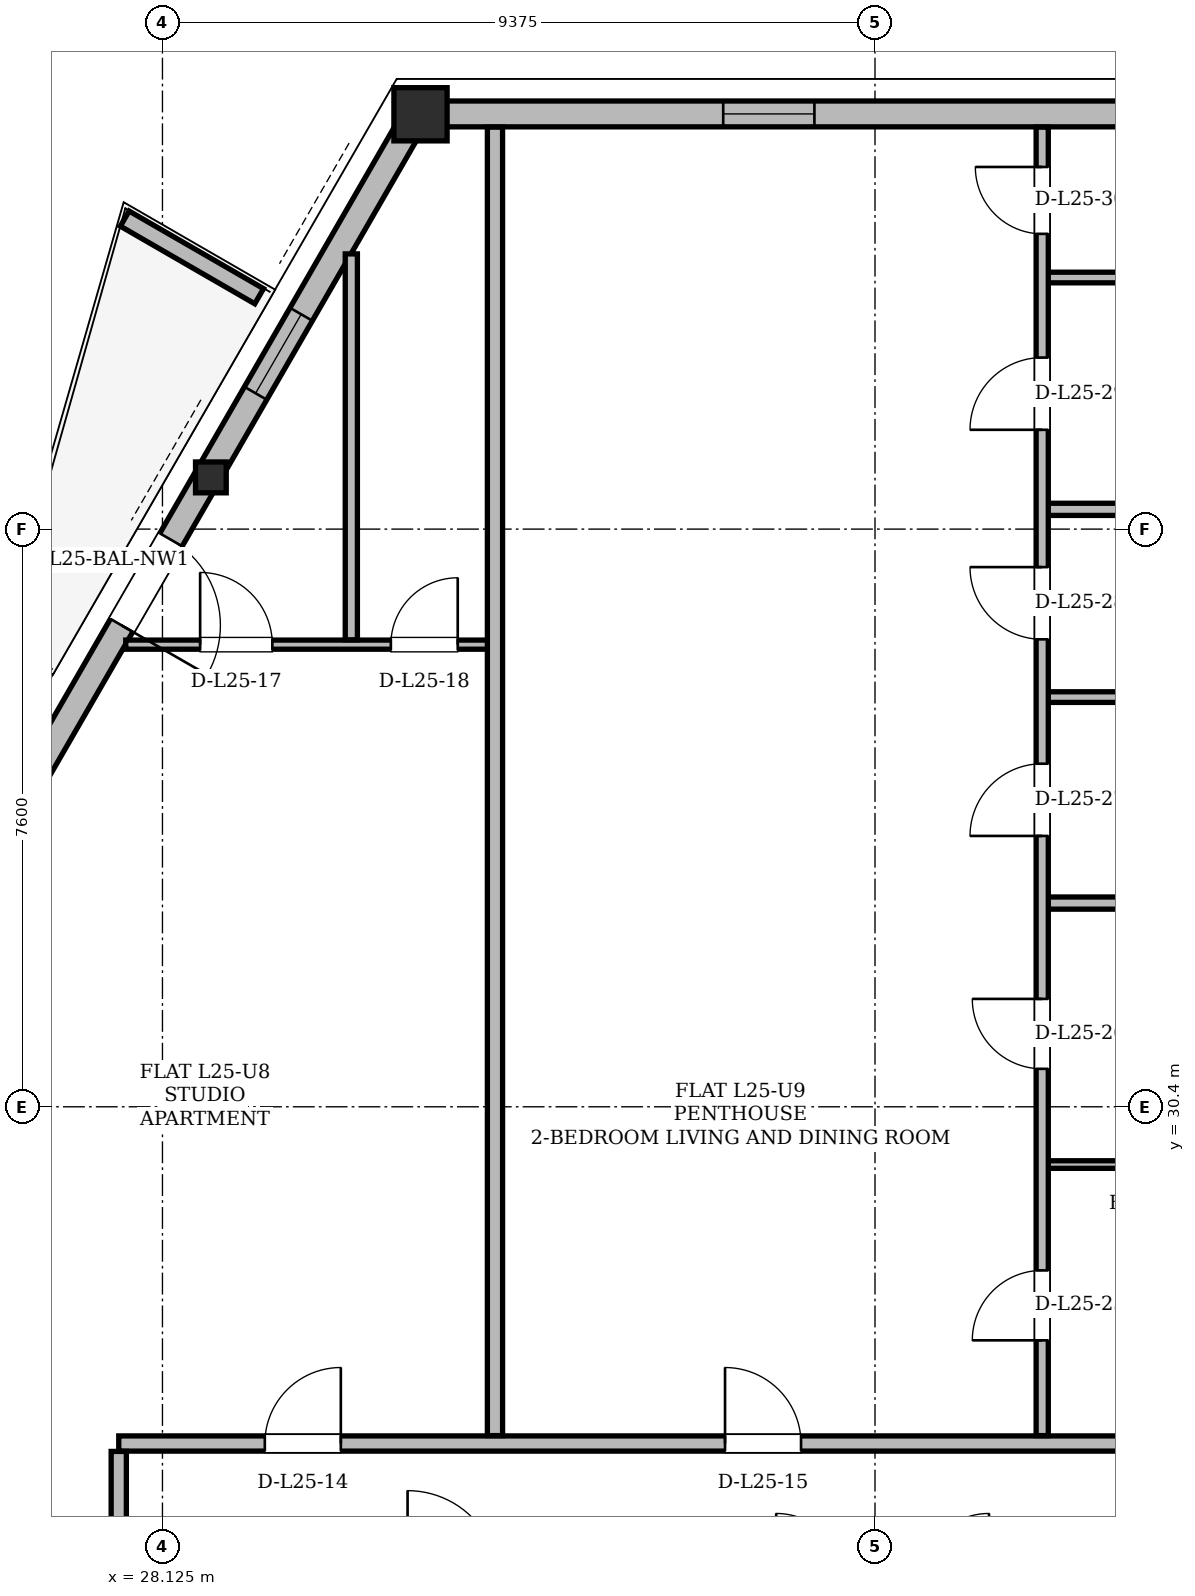
"""IFC4 building model, lengths in metres.
Left out: names, types, materials, properties, quantities, classifications, styles, units other than length and angle.
Written with IfcOpenShell. Run it as: python <this file> out.ifc"""

import sys

from ifc_helpers import new_model, si_unit, direction, frame, frame_2d, origin, origin_2d, place, context, subcontext, project, spatial, polyline, rectangle, hollow_rectangle, i_section, outline, extrude, element, fill, save


model = new_model("IFC4")
c1 = context("Model", 3, precision=1e-05, world=origin(), true_north=direction((0.0, 1.0)))
c2 = subcontext(c1, "Body", "Model", "MODEL_VIEW")
j1 = project(units=[si_unit("LENGTHUNIT", "METRE"), si_unit("PLANEANGLEUNIT", "RADIAN")], contexts=[c1])
p1 = place(None, origin())
s1 = spatial("IfcSite", under=j1, at=p1, CompositionType="ELEMENT")
p2 = place(p1, origin())
s2 = spatial("IfcBuilding", under=s1, at=p2, CompositionType="ELEMENT")
p3 = place(p2, frame((0.0, 0.0, 96.9)))
s3 = spatial("IfcBuildingStorey", under=s2, at=p3, CompositionType="ELEMENT", Elevation=96.9)
p4 = place(p3, frame((31.472, 43.462, 0.005), z_axis=(0.026708710298, -0.002650482701, 0.999639744976), x_axis=(0.098751584092, 0.995112116618, 0.0)))
e1 = element("IfcColumn", 1, at=p4, inside=s3, PredefinedType="COLUMN", context=c2, shape_type="SweptSolid", body=[
    extrude(hollow_rectangle(XDim=0.7, YDim=0.7, WallThickness=0.055, at=origin_2d()), origin(), (0.0, 0.0, 1.0), 3.592),
])
p5 = place(p3, frame((28.717, 38.691, 0.005), z_axis=(0.024942541221, -0.005708919517, 0.999672585338), x_axis=(0.223113275422, 0.974792524761, 0.0)))
e2 = element("IfcColumn", 2, at=p5, inside=s3, PredefinedType="COLUMN", context=c2, shape_type="SweptSolid", body=[
    extrude(i_section(OverallWidth=0.404, OverallDepth=0.406, WebThickness=0.027, FlangeThickness=0.044, at=origin_2d()), origin(), (0.0, 0.0, 1.0), 3.592),
])
p6 = place(p3, frame((43.528, 43.462, 0.0), z_axis=(0.0, 0.0, 1.0), x_axis=(-1.0, 0.0, 0.0)))
e3 = element("IfcWall", 3, at=p6, inside=s3, PredefinedType="SOLIDWALL", context=c2, shape_type="SweptSolid", body=[
    extrude(rectangle(XDim=12.056, YDim=0.34, at=frame_2d((6.028, 0.0))), origin(), (0.0, 0.0, 1.0), 2.578),
])
p7 = place(p6, frame((6.825, 0.0, 0.85)))
e4 = element("IfcOpeningElement", 4, at=p7, cuts=e3, PredefinedType="OPENING", context=c2, shape_type="SweptSolid", body=[
    extrude(rectangle(XDim=1.2, YDim=1.48, at=frame_2d((0.6, 0.74))), frame((0.0, 0.17, 0.0), z_axis=(0.0, -1.0, 0.0), x_axis=(1.0, 0.0, 0.0)), (0.0, 0.0, 1.0), 0.34),
])
p8 = place(p3, frame((31.472, 43.462, 0.0), z_axis=(0.0, 0.0, 1.0), x_axis=(-0.499995749028, -0.86602785807, 0.0)))
e5 = element("IfcWall", 5, at=p8, inside=s3, PredefinedType="SOLIDWALL", context=c2, shape_type="SweptSolid", body=[
    extrude(rectangle(XDim=34.437, YDim=0.34, at=frame_2d((17.218, 0.0))), origin(), (0.0, 0.0, 1.0), 2.578),
])
p9 = place(p8, frame((6.469, 0.0, 0.0)))
e6 = element("IfcOpeningElement", 6, at=p9, cuts=e5, PredefinedType="OPENING", context=c2, shape_type="SweptSolid", body=[
    extrude(rectangle(XDim=1.3, YDim=2.2, at=frame_2d((0.65, 1.1))), frame((0.0, 0.17, 0.0), z_axis=(0.0, -1.0, 0.0), x_axis=(1.0, 0.0, 0.0)), (0.0, 0.0, 1.0), 0.34),
])
p10 = place(p8, frame((24.902, 0.0, 0.0)))
e7 = element("IfcOpeningElement", 7, at=p10, cuts=e5, PredefinedType="OPENING", context=c2, shape_type="SweptSolid", body=[
    extrude(rectangle(XDim=1.5, YDim=2.2, at=frame_2d((0.75, 1.1))), frame((0.0, 0.17, 0.0), z_axis=(0.0, -1.0, 0.0), x_axis=(1.0, 0.0, 0.0)), (0.0, 0.0, 1.0), 0.34),
])
p11 = place(p8, frame((30.75, 0.0, 0.85)))
e8 = element("IfcOpeningElement", 8, at=p11, cuts=e5, PredefinedType="OPENING", context=c2, shape_type="SweptSolid", body=[
    extrude(rectangle(XDim=1.4, YDim=1.6, at=frame_2d((0.7, 0.8))), frame((0.0, 0.17, 0.0), z_axis=(0.0, -1.0, 0.0), x_axis=(1.0, 0.0, 0.0)), (0.0, 0.0, 1.0), 0.34),
])
p12 = place(p8, frame((11.337, 0.0, 0.85)))
e9 = element("IfcOpeningElement", 9, at=p12, cuts=e5, PredefinedType="OPENING", context=c2, shape_type="SweptSolid", body=[
    extrude(rectangle(XDim=2.8, YDim=1.618, at=frame_2d((1.4, 0.809))), frame((0.0, 0.17, 0.0), z_axis=(0.0, -1.0, 0.0), x_axis=(1.0, 0.0, 0.0)), (0.0, 0.0, 1.0), 0.34),
])
p13 = place(p8, frame((18.111, 0.0, 0.85)))
e10 = element("IfcOpeningElement", 10, at=p13, cuts=e5, PredefinedType="OPENING", context=c2, shape_type="SweptSolid", body=[
    extrude(rectangle(XDim=2.2, YDim=1.618, at=frame_2d((1.1, 0.809))), frame((0.0, 0.17, 0.0), z_axis=(0.0, -1.0, 0.0), x_axis=(1.0, 0.0, 0.0)), (0.0, 0.0, 1.0), 0.34),
])
p14 = place(p8, frame((3.044, 0.0, 0.85)))
e11 = element("IfcOpeningElement", 11, at=p14, cuts=e5, PredefinedType="OPENING", context=c2, shape_type="SweptSolid", body=[
    extrude(rectangle(XDim=1.2, YDim=1.48, at=frame_2d((0.6, 0.74))), frame((0.0, 0.17, 0.0), z_axis=(0.0, -1.0, 0.0), x_axis=(1.0, 0.0, 0.0)), (0.0, 0.0, 1.0), 0.34),
])
p15 = place(p3, frame((29.397, 41.064, 0.0), z_axis=(0.0, 0.0, 1.0), x_axis=(-0.866042246008, 0.499970827278, 0.0)))
e12 = element("IfcWall", 12, at=p15, inside=s3, PredefinedType="PARAPET", context=c2, shape_type="SweptSolid", body=[
    extrude(outline(polyline([(0.0, 0.0), (2.042, 0.0), (2.042, 1.1), (0.0, 1.32), (0.0, 0.0)])), frame((0.0, 0.115, 0.0), z_axis=(0.0, -1.0, 0.0), x_axis=(1.0, 0.0, 0.0)), (0.0, 0.0, 1.0), 0.23),
])
p16 = place(p3, frame((27.55, 25.97, 0.0), z_axis=(0.0, 0.0, 1.0), x_axis=(1.0, 0.0, 0.0)))
e13 = element("IfcWall", 13, at=p16, inside=s3, PredefinedType="PARTITIONING", context=c2, shape_type="SweptSolid", body=[
    extrude(rectangle(XDim=19.9, YDim=0.2, at=frame_2d((9.95, 0.0))), origin(), (0.0, 0.0, 1.0), 2.814),
])
p17 = place(p16, frame((1.922, 0.0, 0.0)))
e14 = element("IfcOpeningElement", 14, at=p17, cuts=e13, PredefinedType="OPENING", context=c2, shape_type="SweptSolid", body=[
    extrude(rectangle(XDim=1.0, YDim=2.18, at=frame_2d((0.5, 1.09))), frame((0.0, 0.1, 0.0), z_axis=(0.0, -1.0, 0.0), x_axis=(1.0, 0.0, 0.0)), (0.0, 0.0, 1.0), 0.2),
])
p18 = place(p16, frame((7.977, 0.0, 0.0)))
e15 = element("IfcOpeningElement", 15, at=p18, cuts=e13, PredefinedType="OPENING", context=c2, shape_type="SweptSolid", body=[
    extrude(rectangle(XDim=1.0, YDim=2.18, at=frame_2d((0.5, 1.09))), frame((0.0, 0.1, 0.0), z_axis=(0.0, -1.0, 0.0), x_axis=(1.0, 0.0, 0.0)), (0.0, 0.0, 1.0), 0.2),
])
p19 = place(p16, frame((16.83, 0.0, 0.0)))
e16 = element("IfcOpeningElement", 16, at=p19, cuts=e13, PredefinedType="OPENING", context=c2, shape_type="SweptSolid", body=[
    extrude(rectangle(XDim=1.0, YDim=2.18, at=frame_2d((0.5, 1.09))), frame((0.0, 0.1, 0.0), z_axis=(0.0, -1.0, 0.0), x_axis=(1.0, 0.0, 0.0)), (0.0, 0.0, 1.0), 0.2),
])
p20 = place(p3, frame((39.7, 29.64, 0.0), z_axis=(0.0, 0.0, 1.0), x_axis=(1.0, 0.0, 0.0)))
e17 = element("IfcWall", 17, at=p20, inside=s3, PredefinedType="PARTITIONING", context=c2, shape_type="SweptSolid", body=[
    extrude(rectangle(XDim=2.85, YDim=0.1, at=frame_2d((1.425, 0.0))), origin(), (0.0, 0.0, 1.0), 3.36),
])
p21 = place(p3, frame((39.7, 33.08, 0.0), z_axis=(0.0, 0.0, 1.0), x_axis=(1.0, 0.0, 0.0)))
e18 = element("IfcWall", 18, at=p21, inside=s3, PredefinedType="PARTITIONING", context=c2, shape_type="SweptSolid", body=[
    extrude(rectangle(XDim=2.85, YDim=0.16, at=frame_2d((1.425, 0.0))), origin(), (0.0, 0.0, 1.0), 3.36),
])
p22 = place(p3, frame((39.7, 35.79, 0.0), z_axis=(0.0, 0.0, 1.0), x_axis=(1.0, 0.0, 0.0)))
e19 = element("IfcWall", 19, at=p22, inside=s3, PredefinedType="PARTITIONING", context=c2, shape_type="SweptSolid", body=[
    extrude(rectangle(XDim=2.85, YDim=0.14, at=frame_2d((1.425, 0.0))), origin(), (0.0, 0.0, 1.0), 3.36),
])
p23 = place(p3, frame((27.642, 36.48, 0.0), z_axis=(0.0, 0.0, 1.0), x_axis=(1.0, 0.0, 0.0)))
e20 = element("IfcWall", 20, at=p23, inside=s3, PredefinedType="PARTITIONING", context=c2, shape_type="SweptSolid", body=[
    extrude(rectangle(XDim=4.908, YDim=0.12, at=frame_2d((2.454, 0.0))), origin(), (0.0, 0.0, 1.0), 2.814),
])
p24 = place(p23, frame((0.979, 0.0, 0.0)))
e21 = element("IfcOpeningElement", 21, at=p24, cuts=e20, PredefinedType="OPENING", context=c2, shape_type="SweptSolid", body=[
    extrude(rectangle(XDim=0.95, YDim=2.1, at=frame_2d((0.475, 1.05))), frame((0.0, 0.06, 0.0), z_axis=(0.0, -1.0, 0.0), x_axis=(1.0, 0.0, 0.0)), (0.0, 0.0, 1.0), 0.12),
])
p25 = place(p23, frame((3.488, 0.0, 0.0)))
e22 = element("IfcOpeningElement", 22, at=p25, cuts=e20, PredefinedType="OPENING", context=c2, shape_type="SweptSolid", body=[
    extrude(rectangle(XDim=0.88, YDim=2.08, at=frame_2d((0.44, 1.04))), frame((0.0, 0.06, 0.0), z_axis=(0.0, -1.0, 0.0), x_axis=(1.0, 0.0, 0.0)), (0.0, 0.0, 1.0), 0.12),
])
p26 = place(p3, frame((39.7, 38.26, 0.0), z_axis=(0.0, 0.0, 1.0), x_axis=(1.0, 0.0, 0.0)))
e23 = element("IfcWall", 23, at=p26, inside=s3, PredefinedType="PARTITIONING", context=c2, shape_type="SweptSolid", body=[
    extrude(rectangle(XDim=2.85, YDim=0.16, at=frame_2d((1.425, 0.0))), origin(), (0.0, 0.0, 1.0), 3.36),
])
p27 = place(p3, frame((39.7, 41.31, 0.0), z_axis=(0.0, 0.0, 1.0), x_axis=(1.0, 0.0, 0.0)))
e24 = element("IfcWall", 24, at=p27, inside=s3, PredefinedType="PARTITIONING", context=c2, shape_type="SweptSolid", body=[
    extrude(rectangle(XDim=2.85, YDim=0.14, at=frame_2d((1.425, 0.0))), origin(), (0.0, 0.0, 1.0), 3.36),
])
p28 = place(p3, frame((27.55, 11.054, 0.0), z_axis=(0.0, 0.0, 1.0), x_axis=(0.0, 1.0, 0.0)))
e25 = element("IfcWall", 25, at=p28, inside=s3, PredefinedType="PARTITIONING", context=c2, shape_type="SweptSolid", body=[
    extrude(rectangle(XDim=14.812, YDim=0.2, at=frame_2d((7.406, 0.0))), origin(), (0.0, 0.0, 1.0), 2.814),
])
p29 = place(p28, frame((3.825, 0.0, 0.0)))
e26 = element("IfcOpeningElement", 26, at=p29, cuts=e25, PredefinedType="OPENING", context=c2, shape_type="SweptSolid", body=[
    extrude(rectangle(XDim=1.0, YDim=2.18, at=frame_2d((0.5, 1.09))), frame((0.0, 0.1, 0.0), z_axis=(0.0, -1.0, 0.0), x_axis=(1.0, 0.0, 0.0)), (0.0, 0.0, 1.0), 0.2),
])
p30 = place(p28, frame((7.788, 0.0, 0.0)))
e27 = element("IfcOpeningElement", 27, at=p30, cuts=e25, PredefinedType="OPENING", context=c2, shape_type="SweptSolid", body=[
    extrude(rectangle(XDim=1.0, YDim=2.18, at=frame_2d((0.5, 1.09))), frame((0.0, 0.1, 0.0), z_axis=(0.0, -1.0, 0.0), x_axis=(1.0, 0.0, 0.0)), (0.0, 0.0, 1.0), 0.2),
])
p31 = place(p3, frame((30.61, 36.544, 0.0), z_axis=(0.0, 0.0, 1.0), x_axis=(0.0, 1.0, 0.0)))
e28 = element("IfcWall", 28, at=p31, inside=s3, PredefinedType="PARTITIONING", context=c2, shape_type="SweptSolid", body=[
    extrude(rectangle(XDim=5.077, YDim=0.16, at=frame_2d((2.539, 0.0))), origin(), (0.0, 0.0, 1.0), 2.578),
])
p32 = place(p3, frame((32.5, 26.074, 0.0), z_axis=(0.0, 0.0, 1.0), x_axis=(0.0, 1.0, 0.0)))
e29 = element("IfcWall", 29, at=p32, inside=s3, PredefinedType="PARTITIONING", context=c2, shape_type="SweptSolid", body=[
    extrude(rectangle(XDim=17.214, YDim=0.2, at=frame_2d((8.607, 0.0))), origin(), (0.0, 0.0, 1.0), 3.36),
])
p33 = place(p3, frame((39.7, 26.074, 0.0), z_axis=(0.0, 0.0, 1.0), x_axis=(0.0, 1.0, 0.0)))
e30 = element("IfcWall", 30, at=p33, inside=s3, PredefinedType="PARTITIONING", context=c2, shape_type="SweptSolid", body=[
    extrude(rectangle(XDim=17.214, YDim=0.16, at=frame_2d((8.607, 0.0))), origin(), (0.0, 0.0, 1.0), 3.36),
])
p34 = place(p33, frame((1.253, 0.0, 0.0)))
e31 = element("IfcOpeningElement", 31, at=p34, cuts=e30, PredefinedType="OPENING", context=c2, shape_type="SweptSolid", body=[
    extrude(rectangle(XDim=0.92, YDim=2.12, at=frame_2d((0.46, 1.06))), frame((0.0, 0.08, 0.0), z_axis=(0.0, -1.0, 0.0), x_axis=(1.0, 0.0, 0.0)), (0.0, 0.0, 1.0), 0.16),
])
p35 = place(p33, frame((4.825, 0.0, 0.0)))
e32 = element("IfcOpeningElement", 32, at=p35, cuts=e30, PredefinedType="OPENING", context=c2, shape_type="SweptSolid", body=[
    extrude(rectangle(XDim=0.92, YDim=2.12, at=frame_2d((0.46, 1.06))), frame((0.0, 0.08, 0.0), z_axis=(0.0, -1.0, 0.0), x_axis=(1.0, 0.0, 0.0)), (0.0, 0.0, 1.0), 0.16),
])
p36 = place(p33, frame((7.889, 0.0, 0.0)))
e33 = element("IfcOpeningElement", 33, at=p36, cuts=e30, PredefinedType="OPENING", context=c2, shape_type="SweptSolid", body=[
    extrude(rectangle(XDim=0.95, YDim=2.1, at=frame_2d((0.475, 1.05))), frame((0.0, 0.08, 0.0), z_axis=(0.0, -1.0, 0.0), x_axis=(1.0, 0.0, 0.0)), (0.0, 0.0, 1.0), 0.16),
])
p37 = place(p33, frame((10.476, 0.0, 0.0)))
e34 = element("IfcOpeningElement", 34, at=p37, cuts=e30, PredefinedType="OPENING", context=c2, shape_type="SweptSolid", body=[
    extrude(rectangle(XDim=0.95, YDim=2.1, at=frame_2d((0.475, 1.05))), frame((0.0, 0.08, 0.0), z_axis=(0.0, -1.0, 0.0), x_axis=(1.0, 0.0, 0.0)), (0.0, 0.0, 1.0), 0.16),
])
p38 = place(p33, frame((13.233, 0.0, 0.0)))
e35 = element("IfcOpeningElement", 35, at=p38, cuts=e30, PredefinedType="OPENING", context=c2, shape_type="SweptSolid", body=[
    extrude(rectangle(XDim=0.95, YDim=2.1, at=frame_2d((0.475, 1.05))), frame((0.0, 0.08, 0.0), z_axis=(0.0, -1.0, 0.0), x_axis=(1.0, 0.0, 0.0)), (0.0, 0.0, 1.0), 0.16),
])
p39 = place(p33, frame((15.811, 0.0, 0.0)))
e36 = element("IfcOpeningElement", 36, at=p39, cuts=e30, PredefinedType="OPENING", context=c2, shape_type="SweptSolid", body=[
    extrude(rectangle(XDim=0.88, YDim=2.08, at=frame_2d((0.44, 1.04))), frame((0.0, 0.08, 0.0), z_axis=(0.0, -1.0, 0.0), x_axis=(1.0, 0.0, 0.0)), (0.0, 0.0, 1.0), 0.16),
])
p40 = place(p9, origin())
e37 = element("IfcDoor", 37, at=p40, inside=s3, OperationType="SINGLE_SWING_RIGHT", PredefinedType="DOOR", context=c2, shape_type="SweptSolid", body=[
    extrude(rectangle(XDim=1.3, YDim=2.2, at=frame_2d((0.65, 1.1))), frame((0.0, 0.025, 0.0), z_axis=(0.0, -1.0, 0.0), x_axis=(1.0, 0.0, 0.0)), (0.0, 0.0, 1.0), 0.05),
])
fill(e6, e37)
p41 = place(p14, origin())
e38 = element("IfcWindow", 38, at=p41, inside=s3, PartitioningType="SINGLE_PANEL", PredefinedType="WINDOW", context=c2, shape_type="SweptSolid", body=[
    extrude(rectangle(XDim=1.2, YDim=1.48, at=frame_2d((0.6, 0.74))), frame((0.0, 0.03, 0.0), z_axis=(0.0, -1.0, 0.0), x_axis=(1.0, 0.0, 0.0)), (0.0, 0.0, 1.0), 0.06),
])
fill(e11, e38)
p42 = place(p7, origin())
e39 = element("IfcWindow", 39, at=p42, inside=s3, PartitioningType="SINGLE_PANEL", PredefinedType="WINDOW", context=c2, shape_type="SweptSolid", body=[
    extrude(rectangle(XDim=1.2, YDim=1.48, at=frame_2d((0.6, 0.74))), frame((0.0, 0.03, 0.0), z_axis=(0.0, -1.0, 0.0), x_axis=(1.0, 0.0, 0.0)), (0.0, 0.0, 1.0), 0.06),
])
fill(e4, e39)
p43 = place(p17, origin())
e40 = element("IfcDoor", 40, at=p43, inside=s3, OperationType="SINGLE_SWING_RIGHT", PredefinedType="DOOR", context=c2, shape_type="SweptSolid", body=[
    extrude(rectangle(XDim=1.0, YDim=2.18, at=frame_2d((0.5, 1.09))), frame((0.0, 0.025, 0.0), z_axis=(0.0, -1.0, 0.0), x_axis=(1.0, 0.0, 0.0)), (0.0, 0.0, 1.0), 0.05),
])
fill(e14, e40)
p44 = place(p18, origin())
e41 = element("IfcDoor", 41, at=p44, inside=s3, OperationType="SINGLE_SWING_LEFT", PredefinedType="DOOR", context=c2, shape_type="SweptSolid", body=[
    extrude(rectangle(XDim=1.0, YDim=2.18, at=frame_2d((0.5, 1.09))), frame((0.0, 0.025, 0.0), z_axis=(0.0, -1.0, 0.0), x_axis=(1.0, 0.0, 0.0)), (0.0, 0.0, 1.0), 0.05),
])
fill(e15, e41)
p45 = place(p24, origin())
e42 = element("IfcDoor", 42, at=p45, inside=s3, OperationType="SINGLE_SWING_LEFT", PredefinedType="DOOR", context=c2, shape_type="SweptSolid", body=[
    extrude(rectangle(XDim=0.95, YDim=2.1, at=frame_2d((0.475, 1.05))), frame((0.0, 0.025, 0.0), z_axis=(0.0, -1.0, 0.0), x_axis=(1.0, 0.0, 0.0)), (0.0, 0.0, 1.0), 0.05),
])
fill(e21, e42)
p46 = place(p25, origin())
e43 = element("IfcDoor", 43, at=p46, inside=s3, OperationType="SINGLE_SWING_RIGHT", PredefinedType="DOOR", context=c2, shape_type="SweptSolid", body=[
    extrude(rectangle(XDim=0.88, YDim=2.08, at=frame_2d((0.44, 1.04))), frame((0.0, 0.025, 0.0), z_axis=(0.0, -1.0, 0.0), x_axis=(1.0, 0.0, 0.0)), (0.0, 0.0, 1.0), 0.05),
])
fill(e22, e43)
p47 = place(p34, origin())
e44 = element("IfcDoor", 44, at=p47, inside=s3, OperationType="SINGLE_SWING_LEFT", PredefinedType="DOOR", context=c2, shape_type="SweptSolid", body=[
    extrude(rectangle(XDim=0.92, YDim=2.12, at=frame_2d((0.46, 1.06))), frame((0.0, 0.025, 0.0), z_axis=(0.0, -1.0, 0.0), x_axis=(1.0, 0.0, 0.0)), (0.0, 0.0, 1.0), 0.05),
])
fill(e31, e44)
p48 = place(p35, origin())
e45 = element("IfcDoor", 45, at=p48, inside=s3, OperationType="SINGLE_SWING_RIGHT", PredefinedType="DOOR", context=c2, shape_type="SweptSolid", body=[
    extrude(rectangle(XDim=0.92, YDim=2.12, at=frame_2d((0.46, 1.06))), frame((0.0, 0.025, 0.0), z_axis=(0.0, -1.0, 0.0), x_axis=(1.0, 0.0, 0.0)), (0.0, 0.0, 1.0), 0.05),
])
fill(e32, e45)
p49 = place(p36, origin())
e46 = element("IfcDoor", 46, at=p49, inside=s3, OperationType="SINGLE_SWING_LEFT", PredefinedType="DOOR", context=c2, shape_type="SweptSolid", body=[
    extrude(rectangle(XDim=0.95, YDim=2.1, at=frame_2d((0.475, 1.05))), frame((0.0, 0.025, 0.0), z_axis=(0.0, -1.0, 0.0), x_axis=(1.0, 0.0, 0.0)), (0.0, 0.0, 1.0), 0.05),
])
fill(e33, e46)
p50 = place(p37, origin())
e47 = element("IfcDoor", 47, at=p50, inside=s3, OperationType="SINGLE_SWING_RIGHT", PredefinedType="DOOR", context=c2, shape_type="SweptSolid", body=[
    extrude(rectangle(XDim=0.95, YDim=2.1, at=frame_2d((0.475, 1.05))), frame((0.0, 0.025, 0.0), z_axis=(0.0, -1.0, 0.0), x_axis=(1.0, 0.0, 0.0)), (0.0, 0.0, 1.0), 0.05),
])
fill(e34, e47)
p51 = place(p38, origin())
e48 = element("IfcDoor", 48, at=p51, inside=s3, OperationType="SINGLE_SWING_LEFT", PredefinedType="DOOR", context=c2, shape_type="SweptSolid", body=[
    extrude(rectangle(XDim=0.95, YDim=2.1, at=frame_2d((0.475, 1.05))), frame((0.0, 0.025, 0.0), z_axis=(0.0, -1.0, 0.0), x_axis=(1.0, 0.0, 0.0)), (0.0, 0.0, 1.0), 0.05),
])
fill(e35, e48)
p52 = place(p39, origin())
e49 = element("IfcDoor", 49, at=p52, inside=s3, OperationType="SINGLE_SWING_RIGHT", PredefinedType="DOOR", context=c2, shape_type="SweptSolid", body=[
    extrude(rectangle(XDim=0.88, YDim=2.08, at=frame_2d((0.44, 1.04))), frame((0.0, 0.025, 0.0), z_axis=(0.0, -1.0, 0.0), x_axis=(1.0, 0.0, 0.0)), (0.0, 0.0, 1.0), 0.05),
])
fill(e36, e49)
save(model, sys.argv[1])
